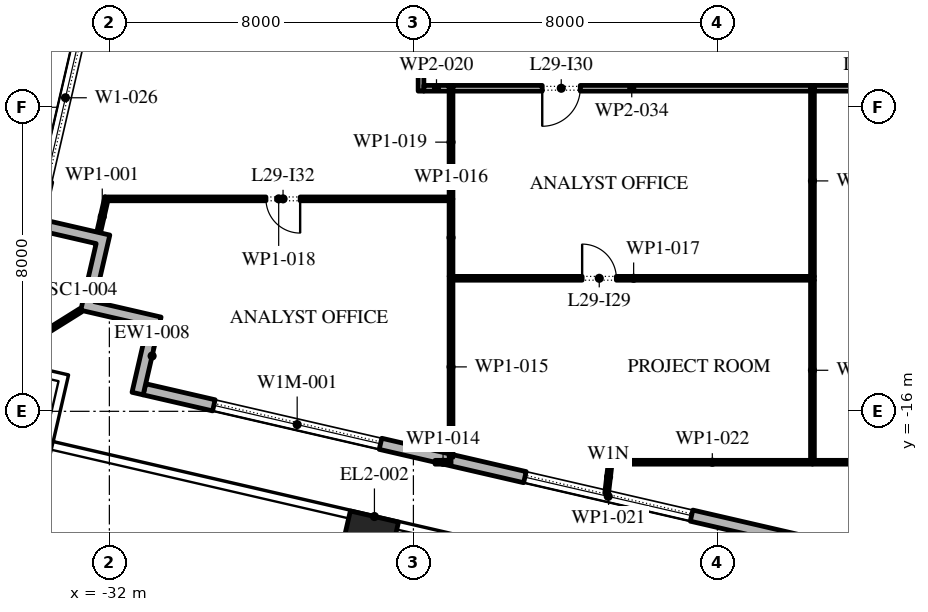
"""IFC4 building model, lengths in metres.
Left out: names, types, materials, properties, quantities, classifications, styles, units other than length and angle.
Written with IfcOpenShell. Run it as: python <this file> out.ifc"""

import sys

from ifc_helpers import new_model, si_unit, direction, frame, frame_2d, origin, origin_2d, place, context, subcontext, project, spatial, polyline, rectangle, outline, extrude, element, fill, save


model = new_model("IFC4")
c1 = context("Model", 3, precision=1e-05, world=origin(), true_north=direction((0.0, 1.0)))
c2 = subcontext(c1, "Body", "Model", "MODEL_VIEW")
j1 = project(units=[si_unit("LENGTHUNIT", "METRE"), si_unit("PLANEANGLEUNIT", "RADIAN")], contexts=[c1])
p1 = place(None, origin())
s1 = spatial("IfcSite", under=j1, at=p1, CompositionType="ELEMENT")
p2 = place(p1, origin())
s2 = spatial("IfcBuilding", under=s1, at=p2, CompositionType="ELEMENT")
p3 = place(p2, frame((0.0, 0.0, 135.0)))
s3 = spatial("IfcBuildingStorey", under=s2, at=p3, CompositionType="ELEMENT", Elevation=135.0)
for number, where, z_axis, x_axis in (
    (1, (-34.282, -17.298, 0.0), (0.0, 0.0, 1.0), (0.974, -0.225, 0.0)),
    (2, (-25.172, -19.402, 0.0), (0.0, 0.0, 1.0), (0.974, -0.225, 0.0)),
):
    element("IfcColumn", number, at=place(p3, frame(where, z_axis=z_axis, x_axis=x_axis)), inside=s3, PredefinedType="COLUMN", context=c2, shape_type="SweptSolid", body=[
        extrude(rectangle(XDim=1.3, YDim=1.3, at=origin_2d()), origin(), (0.0, 0.0, 1.0), 4.2),
    ])
p4 = place(p3, frame((-31.078, -15.421, 0.0), z_axis=(0.0, 0.0, 1.0), x_axis=(0.974370456532, -0.224949357493, 0.0)))
e3 = element("IfcWall", 3, at=p4, inside=s3, PredefinedType="STANDARD", context=c2, shape_type="SweptSolid", body=[
    extrude(rectangle(XDim=51.0, YDim=0.3, at=frame_2d((25.5, 0.0))), origin(), (0.0, 0.0, 1.0), 4.0),
])
p5 = place(p4, frame((1.875, 0.0, 0.45)))
e4 = element("IfcOpeningElement", 4, at=p5, cuts=e3, PredefinedType="OPENING", context=c2, shape_type="SweptSolid", body=[
    extrude(rectangle(XDim=4.5, YDim=2.575, at=frame_2d((2.25, 1.288))), frame((0.0, 0.16, 0.0), z_axis=(0.0, -1.0, 0.0), x_axis=(1.0, 0.0, 0.0)), (0.0, 0.0, 1.0), 0.32),
])
p6 = place(p4, frame((10.275, 0.0, 0.45)))
e5 = element("IfcOpeningElement", 5, at=p6, cuts=e3, PredefinedType="OPENING", context=c2, shape_type="SweptSolid", body=[
    extrude(rectangle(XDim=4.5, YDim=2.525, at=frame_2d((2.25, 1.262))), frame((0.0, 0.16, 0.0), z_axis=(0.0, -1.0, 0.0), x_axis=(1.0, 0.0, 0.0)), (0.0, 0.0, 1.0), 0.32),
])
p7 = place(p4, frame((18.825, 0.0, 0.45)))
e6 = element("IfcOpeningElement", 6, at=p7, cuts=e3, PredefinedType="OPENING", context=c2, shape_type="SweptSolid", body=[
    extrude(rectangle(XDim=4.5, YDim=2.5, at=frame_2d((2.25, 1.25))), frame((0.0, 0.16, 0.0), z_axis=(0.0, -1.0, 0.0), x_axis=(1.0, 0.0, 0.0)), (0.0, 0.0, 1.0), 0.32),
])
p8 = place(p4, frame((28.425, 0.0, 0.0)))
e7 = element("IfcOpeningElement", 7, at=p8, cuts=e3, PredefinedType="OPENING", context=c2, shape_type="SweptSolid", body=[
    extrude(rectangle(XDim=2.4, YDim=2.9, at=frame_2d((1.2, 1.45))), frame((0.0, 0.16, 0.0), z_axis=(0.0, -1.0, 0.0), x_axis=(1.0, 0.0, 0.0)), (0.0, 0.0, 1.0), 0.32),
])
p9 = place(p4, frame((35.925, 0.0, 0.45)))
e8 = element("IfcOpeningElement", 8, at=p9, cuts=e3, PredefinedType="OPENING", context=c2, shape_type="SweptSolid", body=[
    extrude(rectangle(XDim=4.5, YDim=2.45, at=frame_2d((2.25, 1.225))), frame((0.0, 0.16, 0.0), z_axis=(0.0, -1.0, 0.0), x_axis=(1.0, 0.0, 0.0)), (0.0, 0.0, 1.0), 0.32),
])
p10 = place(p4, frame((44.475, 0.0, 0.45)))
e9 = element("IfcOpeningElement", 9, at=p10, cuts=e3, PredefinedType="OPENING", context=c2, shape_type="SweptSolid", body=[
    extrude(rectangle(XDim=4.5, YDim=2.45, at=frame_2d((2.25, 1.225))), frame((0.0, 0.16, 0.0), z_axis=(0.0, -1.0, 0.0), x_axis=(1.0, 0.0, 0.0)), (0.0, 0.0, 1.0), 0.32),
])
p11 = place(p3, frame((-22.82, 37.016, 0.0), z_axis=(0.0, 0.0, 1.0), x_axis=(-0.224953880882, -0.974369412223, 0.0)))
e10 = element("IfcWall", 10, at=p11, inside=s3, PredefinedType="STANDARD", context=c2, shape_type="SweptSolid", body=[
    extrude(rectangle(XDim=49.5, YDim=0.3, at=frame_2d((24.75, 0.0))), origin(), (0.0, 0.0, 1.0), 4.0),
])
p12 = place(p11, frame((1.157, 0.0, 0.45)))
e11 = element("IfcOpeningElement", 11, at=p12, cuts=e10, PredefinedType="OPENING", context=c2, shape_type="SweptSolid", body=[
    extrude(rectangle(XDim=4.5, YDim=3.05, at=frame_2d((2.25, 1.525))), frame((0.0, 0.16, 0.0), z_axis=(0.0, -1.0, 0.0), x_axis=(1.0, 0.0, 0.0)), (0.0, 0.0, 1.0), 0.32),
])
p13 = place(p11, frame((8.121, 0.0, 0.45)))
e12 = element("IfcOpeningElement", 12, at=p13, cuts=e10, PredefinedType="OPENING", context=c2, shape_type="SweptSolid", body=[
    extrude(rectangle(XDim=4.5, YDim=3.05, at=frame_2d((2.25, 1.525))), frame((0.0, 0.16, 0.0), z_axis=(0.0, -1.0, 0.0), x_axis=(1.0, 0.0, 0.0)), (0.0, 0.0, 1.0), 0.32),
])
p14 = place(p11, frame((15.236, 0.0, 0.45)))
e13 = element("IfcOpeningElement", 13, at=p14, cuts=e10, PredefinedType="OPENING", context=c2, shape_type="SweptSolid", body=[
    extrude(rectangle(XDim=4.5, YDim=3.05, at=frame_2d((2.25, 1.525))), frame((0.0, 0.16, 0.0), z_axis=(0.0, -1.0, 0.0), x_axis=(1.0, 0.0, 0.0)), (0.0, 0.0, 1.0), 0.32),
])
p15 = place(p11, frame((23.4, 0.0, 0.0)))
e14 = element("IfcOpeningElement", 14, at=p15, cuts=e10, PredefinedType="OPENING", context=c2, shape_type="SweptSolid", body=[
    extrude(rectangle(XDim=2.4, YDim=3.5, at=frame_2d((1.2, 1.75))), frame((0.0, 0.16, 0.0), z_axis=(0.0, -1.0, 0.0), x_axis=(1.0, 0.0, 0.0)), (0.0, 0.0, 1.0), 0.32),
])
p16 = place(p11, frame((29.464, 0.0, 0.45)))
e15 = element("IfcOpeningElement", 15, at=p16, cuts=e10, PredefinedType="OPENING", context=c2, shape_type="SweptSolid", body=[
    extrude(rectangle(XDim=4.5, YDim=2.875, at=frame_2d((2.25, 1.438))), frame((0.0, 0.16, 0.0), z_axis=(0.0, -1.0, 0.0), x_axis=(1.0, 0.0, 0.0)), (0.0, 0.0, 1.0), 0.32),
])
p17 = place(p11, frame((36.579, 0.0, 0.45)))
e16 = element("IfcOpeningElement", 16, at=p17, cuts=e10, PredefinedType="OPENING", context=c2, shape_type="SweptSolid", body=[
    extrude(rectangle(XDim=4.5, YDim=2.675, at=frame_2d((2.25, 1.337))), frame((0.0, 0.16, 0.0), z_axis=(0.0, -1.0, 0.0), x_axis=(1.0, 0.0, 0.0)), (0.0, 0.0, 1.0), 0.32),
])
p18 = place(p11, frame((43.693, 0.0, 0.45)))
e17 = element("IfcOpeningElement", 17, at=p18, cuts=e10, PredefinedType="OPENING", context=c2, shape_type="SweptSolid", body=[
    extrude(rectangle(XDim=4.5, YDim=3.05, at=frame_2d((2.25, 1.525))), frame((0.0, 0.16, 0.0), z_axis=(0.0, -1.0, 0.0), x_axis=(1.0, 0.0, 0.0)), (0.0, 0.0, 1.0), 0.32),
])
p19 = place(p3, origin())
e18 = element("IfcWall", 18, at=p19, inside=s3, PredefinedType="STANDARD", context=c2, shape_type="SweptSolid", body=[
    extrude(outline(polyline([(-32.393, -13.116), (-30.639, -13.521), (-31.111, -15.567), (-31.404, -15.5), (-30.999, -13.746), (-32.753, -13.341), (-32.348, -11.587), (-33.809, -11.25), (-33.742, -10.957), (-31.988, -11.362), (-32.393, -13.116)])), origin(), (0.0, 0.0, 1.0), 4.0),
])
p20 = place(p3, frame((-32.753, -13.341, -0.05), z_axis=(0.0, 0.0, 1.0), x_axis=(-0.848059759764, -0.529900598103, 0.0)))
e19 = element("IfcWall", 19, at=p20, inside=s3, PredefinedType="STANDARD", context=c2, shape_type="SweptSolid", body=[
    extrude(rectangle(XDim=2.455, YDim=0.1, at=frame_2d((1.228, 0.0))), origin(), (0.0, 0.0, 1.0), 4.05),
])
p21 = place(p3, frame((-32.069, -10.361, 0.0), z_axis=(0.0, 0.0, 1.0), x_axis=(-0.222987762652, -0.974821243976, 0.0)))
e20 = element("IfcWall", 20, at=p21, inside=s3, PredefinedType="PARTITIONING", context=c2, shape_type="SweptSolid", body=[
    extrude(rectangle(XDim=1.058, YDim=0.1, at=frame_2d((0.529, 0.0))), origin(), (0.0, 0.0, 1.0), 4.0),
])
p22 = place(p3, frame((-23.8, -7.575, 0.0), z_axis=(0.0, 0.0, 1.0), x_axis=(0.0, 1.0, 0.0)))
e21 = element("IfcWall", 21, at=p22, inside=s3, PredefinedType="PARTITIONING", context=c2, shape_type="SweptSolid", body=[
    extrude(rectangle(XDim=3.255, YDim=0.15, at=frame_2d((1.627, 0.0))), origin(), (0.0, 0.0, 1.0), 4.0),
])
p23 = place(p22, frame((1.105, 0.0, 0.0)))
e22 = element("IfcOpeningElement", 22, at=p23, cuts=e21, PredefinedType="OPENING", context=c2, shape_type="SweptSolid", body=[
    extrude(rectangle(XDim=1.0, YDim=2.1, at=frame_2d((0.5, 1.05))), frame((0.0, 0.085, 0.0), z_axis=(0.0, -1.0, 0.0), x_axis=(1.0, 0.0, 0.0)), (0.0, 0.0, 1.0), 0.17),
])
p24 = place(p3, frame((-23.43, -17.34, 0.0), z_axis=(0.0, 0.0, 1.0), x_axis=(1.0, 0.0, 0.0)))
e23 = element("IfcWall", 23, at=p24, inside=s3, PredefinedType="PARTITIONING", context=c2, shape_type="SweptSolid", body=[
    extrude(rectangle(XDim=0.42, YDim=0.1, at=frame_2d((0.21, 0.0))), origin(), (0.0, 0.0, 1.0), 4.0),
])
p25 = place(p3, frame((-23.01, -17.212, 0.0), z_axis=(0.0, 0.0, 1.0), x_axis=(0.0, 1.0, 0.0)))
e24 = element("IfcWall", 24, at=p25, inside=s3, PredefinedType="PARTITIONING", context=c2, shape_type="SweptSolid", body=[
    extrude(rectangle(XDim=4.762, YDim=0.1, at=frame_2d((2.381, 0.0))), origin(), (0.0, 0.0, 1.0), 4.0),
])
p26 = place(p3, frame((-23.01, -12.45, 0.0), z_axis=(0.0, 0.0, 1.0), x_axis=(0.0, 1.0, 0.0)))
e25 = element("IfcWall", 25, at=p26, inside=s3, PredefinedType="PARTITIONING", context=c2, shape_type="SweptSolid", body=[
    extrude(rectangle(XDim=2.04, YDim=0.1, at=frame_2d((1.02, 0.0))), origin(), (0.0, 0.0, 1.0), 4.0),
])
p27 = place(p3, frame((-22.96, -12.5, 0.0), z_axis=(0.0, 0.0, 1.0), x_axis=(1.0, 0.0, 0.0)))
e26 = element("IfcWall", 26, at=p27, inside=s3, PredefinedType="PARTITIONING", context=c2, shape_type="SweptSolid", body=[
    extrude(rectangle(XDim=9.51, YDim=0.1, at=frame_2d((4.755, 0.0))), origin(), (0.0, 0.0, 1.0), 4.0),
])
p28 = place(p27, frame((3.4, 0.0, 0.0)))
e27 = element("IfcOpeningElement", 27, at=p28, cuts=e26, PredefinedType="OPENING", context=c2, shape_type="SweptSolid", body=[
    extrude(rectangle(XDim=0.9, YDim=2.1, at=frame_2d((0.45, 1.05))), frame((0.0, 0.06, 0.0), z_axis=(0.0, -1.0, 0.0), x_axis=(1.0, 0.0, 0.0)), (0.0, 0.0, 1.0), 0.12),
])
p29 = place(p3, frame((-23.06, -10.41, 0.0), z_axis=(0.0, 0.0, 1.0), x_axis=(-1.0, 0.0, 0.0)))
e28 = element("IfcWall", 28, at=p29, inside=s3, PredefinedType="PARTITIONING", context=c2, shape_type="SweptSolid", body=[
    extrude(rectangle(XDim=8.97, YDim=0.1, at=frame_2d((4.485, 0.0))), origin(), (0.0, 0.0, 1.0), 4.0),
])
p30 = place(p29, frame((3.92, 0.0, 0.0)))
e29 = element("IfcOpeningElement", 29, at=p30, cuts=e28, PredefinedType="OPENING", context=c2, shape_type="SweptSolid", body=[
    extrude(rectangle(XDim=0.9, YDim=2.1, at=frame_2d((0.45, 1.05))), frame((0.0, 0.06, 0.0), z_axis=(0.0, -1.0, 0.0), x_axis=(1.0, 0.0, 0.0)), (0.0, 0.0, 1.0), 0.12),
])
p31 = place(p3, frame((-23.01, -10.41, 0.0), z_axis=(0.0, 0.0, 1.0), x_axis=(0.0, 1.0, 0.0)))
e30 = element("IfcWall", 30, at=p31, inside=s3, PredefinedType="PARTITIONING", context=c2, shape_type="SweptSolid", body=[
    extrude(rectangle(XDim=2.985, YDim=0.1, at=frame_2d((1.492, 0.0))), origin(), (0.0, 0.0, 1.0), 4.0),
])
p32 = place(p3, frame((-23.06, -7.5, 0.0), z_axis=(0.0, 0.0, 1.0), x_axis=(-1.0, 0.0, 0.0)))
e31 = element("IfcWall", 31, at=p32, inside=s3, PredefinedType="PARTITIONING", context=c2, shape_type="SweptSolid", body=[
    extrude(rectangle(XDim=0.665, YDim=0.15, at=frame_2d((0.333, 0.0))), origin(), (0.0, 0.0, 1.0), 4.0),
])
p33 = place(p3, frame((-18.915, -18.157, 0.0), z_axis=(0.0, 0.0, 1.0), x_axis=(0.11580251051, 0.993272258024, 0.0)))
e32 = element("IfcWall", 32, at=p33, inside=s3, PredefinedType="PARTITIONING", context=c2, shape_type="SweptSolid", body=[
    extrude(rectangle(XDim=0.873, YDim=0.1, at=frame_2d((0.437, 0.0))), origin(), (0.0, 0.0, 1.0), 4.0),
])
p34 = place(p3, frame((-18.77, -17.34, 0.0), z_axis=(0.0, 0.0, 1.0), x_axis=(1.0, 0.0, 0.0)))
e33 = element("IfcWall", 33, at=p34, inside=s3, PredefinedType="PARTITIONING", context=c2, shape_type="SweptSolid", body=[
    extrude(rectangle(XDim=5.27, YDim=0.1, at=frame_2d((2.635, 0.0))), origin(), (0.0, 0.0, 1.0), 4.0),
])
p35 = place(p3, frame((-13.5, -17.29, 0.0), z_axis=(0.0, 0.0, 1.0), x_axis=(0.0, 1.0, 0.0)))
e34 = element("IfcWall", 34, at=p35, inside=s3, PredefinedType="PARTITIONING", context=c2, shape_type="SweptSolid", body=[
    extrude(rectangle(XDim=4.74, YDim=0.1, at=frame_2d((2.37, 0.0))), origin(), (0.0, 0.0, 1.0), 4.0),
])
p36 = place(p3, frame((-13.5, -17.34, 0.0), z_axis=(0.0, 0.0, 1.0), x_axis=(1.0, 0.0, 0.0)))
e35 = element("IfcWall", 35, at=p36, inside=s3, PredefinedType="PARTITIONING", context=c2, shape_type="SweptSolid", body=[
    extrude(rectangle(XDim=7.21, YDim=0.1, at=frame_2d((3.605, 0.0))), origin(), (0.0, 0.0, 1.0), 4.0),
])
p37 = place(p36, frame((1.7, 0.0, 0.0)))
e36 = element("IfcOpeningElement", 36, at=p37, cuts=e35, PredefinedType="OPENING", context=c2, shape_type="SweptSolid", body=[
    extrude(rectangle(XDim=0.9, YDim=2.1, at=frame_2d((0.45, 1.05))), frame((0.0, 0.06, 0.0), z_axis=(0.0, -1.0, 0.0), x_axis=(1.0, 0.0, 0.0)), (0.0, 0.0, 1.0), 0.12),
])
p38 = place(p3, frame((-13.5, -12.45, 0.0), z_axis=(0.0, 0.0, 1.0), x_axis=(0.0, 1.0, 0.0)))
e37 = element("IfcWall", 37, at=p38, inside=s3, PredefinedType="PARTITIONING", context=c2, shape_type="SweptSolid", body=[
    extrude(rectangle(XDim=5.025, YDim=0.1, at=frame_2d((2.512, 0.0))), origin(), (0.0, 0.0, 1.0), 4.0),
])
p39 = place(p3, frame((-13.55, -7.5, 0.0), z_axis=(0.0, 0.0, 1.0), x_axis=(-1.0, 0.0, 0.0)))
e38 = element("IfcWall", 38, at=p39, inside=s3, PredefinedType="PARTITIONING", context=c2, shape_type="SweptSolid", body=[
    extrude(rectangle(XDim=9.41, YDim=0.15, at=frame_2d((4.705, 0.0))), origin(), (0.0, 0.0, 1.0), 4.0),
])
p40 = place(p39, frame((6.06, 0.0, 0.0)))
e39 = element("IfcOpeningElement", 39, at=p40, cuts=e38, PredefinedType="OPENING", context=c2, shape_type="SweptSolid", body=[
    extrude(rectangle(XDim=1.0, YDim=2.1, at=frame_2d((0.5, 1.05))), frame((0.0, 0.085, 0.0), z_axis=(0.0, -1.0, 0.0), x_axis=(1.0, 0.0, 0.0)), (0.0, 0.0, 1.0), 0.17),
])
p41 = place(p3, frame((-8.2, -7.5, 0.0), z_axis=(0.0, 0.0, 1.0), x_axis=(-1.0, 0.0, 0.0)))
e40 = element("IfcWall", 40, at=p41, inside=s3, PredefinedType="PARTITIONING", context=c2, shape_type="SweptSolid", body=[
    extrude(rectangle(XDim=5.25, YDim=0.15, at=frame_2d((2.625, 0.0))), origin(), (0.0, 0.0, 1.0), 4.0),
])
p42 = place(p41, frame((3.15, 0.0, 0.0)))
e41 = element("IfcOpeningElement", 41, at=p42, cuts=e40, PredefinedType="OPENING", context=c2, shape_type="SweptSolid", body=[
    extrude(rectangle(XDim=1.0, YDim=2.1, at=frame_2d((0.5, 1.05))), frame((0.0, 0.085, 0.0), z_axis=(0.0, -1.0, 0.0), x_axis=(1.0, 0.0, 0.0)), (0.0, 0.0, 1.0), 0.17),
])
p43 = place(p5, origin())
e42 = element("IfcWindow", 42, at=p43, inside=s3, PartitioningType="DOUBLE_PANEL_VERTICAL", PredefinedType="WINDOW", context=c2, shape_type="SweptSolid", body=[
    extrude(rectangle(XDim=4.5, YDim=2.575, at=frame_2d((2.25, 1.288))), frame((0.0, 0.03, 0.0), z_axis=(0.0, -1.0, 0.0), x_axis=(1.0, 0.0, 0.0)), (0.0, 0.0, 1.0), 0.06),
])
fill(e4, e42)
p44 = place(p6, origin())
e43 = element("IfcWindow", 43, at=p44, inside=s3, PartitioningType="DOUBLE_PANEL_VERTICAL", PredefinedType="WINDOW", context=c2, shape_type="SweptSolid", body=[
    extrude(rectangle(XDim=4.5, YDim=2.525, at=frame_2d((2.25, 1.262))), frame((0.0, 0.03, 0.0), z_axis=(0.0, -1.0, 0.0), x_axis=(1.0, 0.0, 0.0)), (0.0, 0.0, 1.0), 0.06),
])
fill(e5, e43)
p45 = place(p18, origin())
e44 = element("IfcWindow", 44, at=p45, inside=s3, PartitioningType="DOUBLE_PANEL_VERTICAL", PredefinedType="WINDOW", context=c2, shape_type="SweptSolid", body=[
    extrude(rectangle(XDim=4.5, YDim=3.05, at=frame_2d((2.25, 1.525))), frame((0.0, 0.03, 0.0), z_axis=(0.0, -1.0, 0.0), x_axis=(1.0, 0.0, 0.0)), (0.0, 0.0, 1.0), 0.06),
])
fill(e17, e44)
p46 = place(p28, origin())
e45 = element("IfcDoor", 45, at=p46, inside=s3, OperationType="SINGLE_SWING_RIGHT", PredefinedType="DOOR", context=c2, shape_type="SweptSolid", body=[
    extrude(rectangle(XDim=0.9, YDim=2.1, at=frame_2d((0.45, 1.05))), frame((0.0, 0.025, 0.0), z_axis=(0.0, -1.0, 0.0), x_axis=(1.0, 0.0, 0.0)), (0.0, 0.0, 1.0), 0.05),
])
fill(e27, e45)
p47 = place(p40, origin())
e46 = element("IfcDoor", 46, at=p47, inside=s3, OperationType="SINGLE_SWING_LEFT", PredefinedType="DOOR", context=c2, shape_type="SweptSolid", body=[
    extrude(rectangle(XDim=1.0, YDim=2.1, at=frame_2d((0.5, 1.05))), frame((0.0, 0.025, 0.0), z_axis=(0.0, -1.0, 0.0), x_axis=(1.0, 0.0, 0.0)), (0.0, 0.0, 1.0), 0.05),
])
fill(e39, e46)
p48 = place(p30, origin())
e47 = element("IfcDoor", 47, at=p48, inside=s3, OperationType="SINGLE_SWING_RIGHT", PredefinedType="DOOR", context=c2, shape_type="SweptSolid", body=[
    extrude(rectangle(XDim=0.9, YDim=2.1, at=frame_2d((0.45, 1.05))), frame((0.0, 0.025, 0.0), z_axis=(0.0, -1.0, 0.0), x_axis=(1.0, 0.0, 0.0)), (0.0, 0.0, 1.0), 0.05),
])
fill(e29, e47)
save(model, sys.argv[1])
